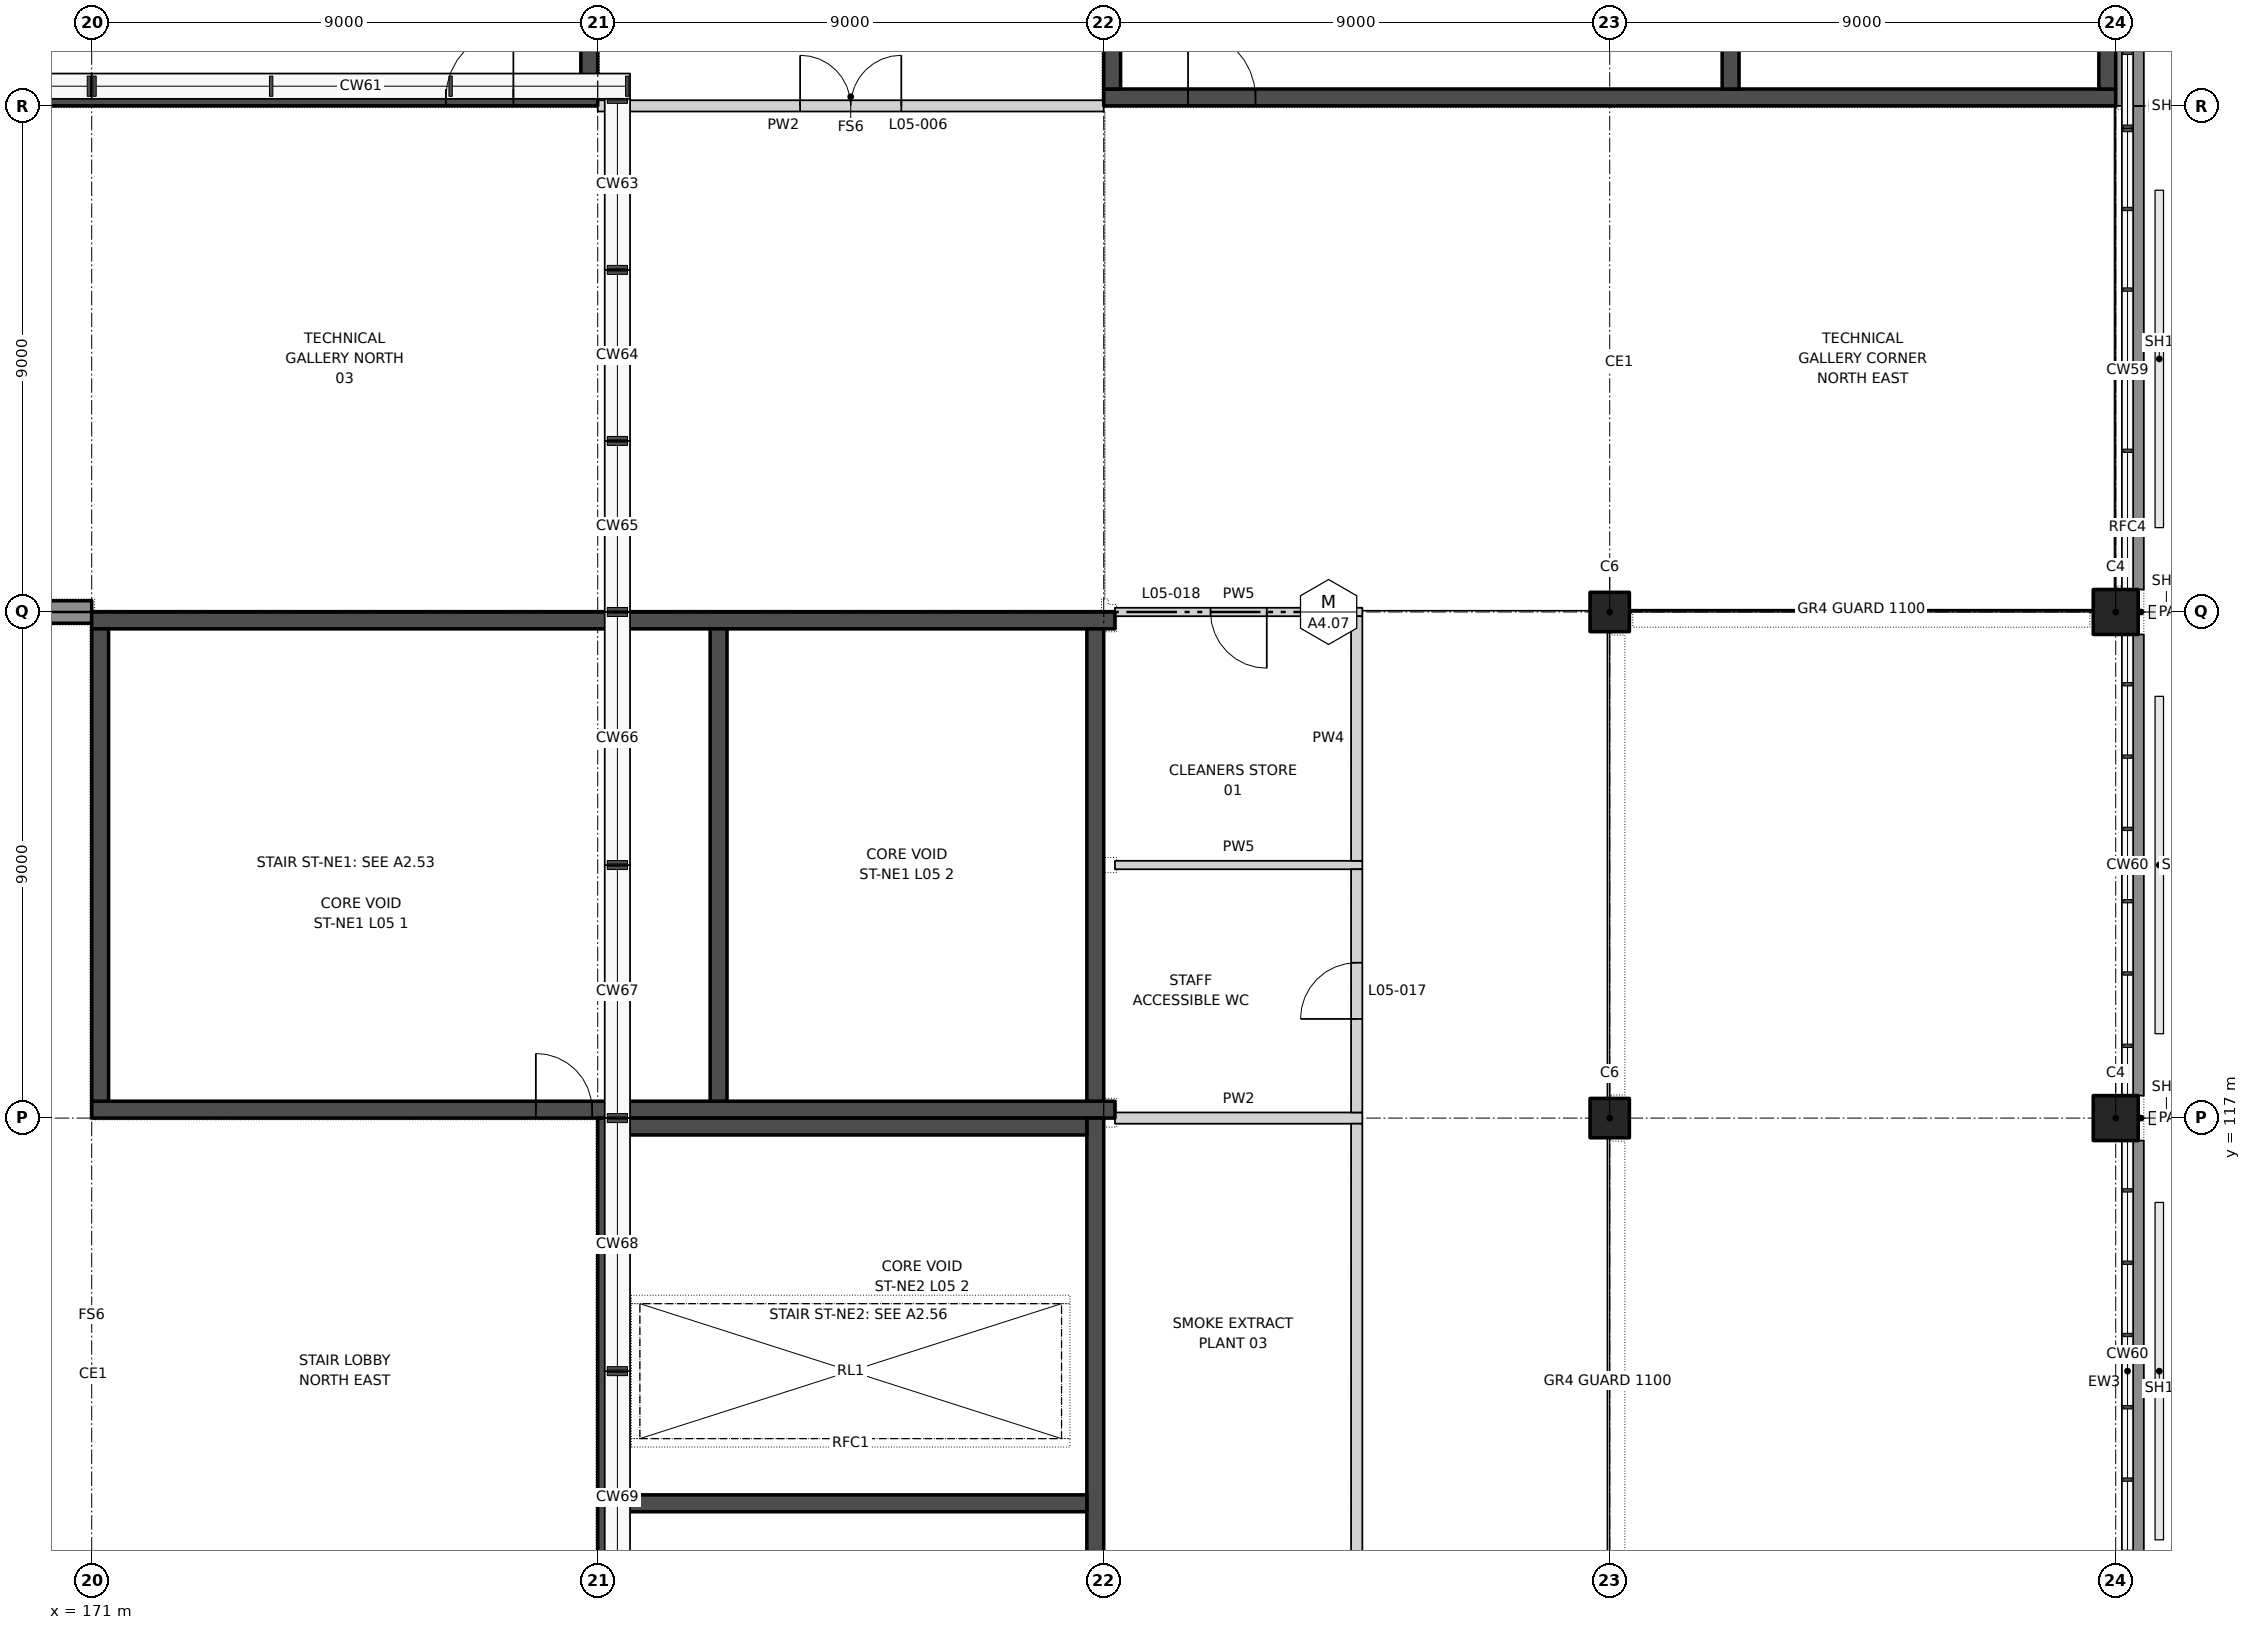
"""IFC4 building model, lengths in metres.
Left out: names, types, materials, properties, quantities, classifications, styles, units other than length and angle.
Written with IfcOpenShell. Run it as: python <this file> out.ifc"""

import sys

from ifc_helpers import new_model, si_unit, direction, frame, frame_2d, origin, origin_2d, place, context, subcontext, project, spatial, rectangle, extrude, element, fill, save


model = new_model("IFC4")
c1 = context("Model", 3, precision=1e-05, world=origin(), true_north=direction((0.0, 1.0)))
c2 = subcontext(c1, "Body", "Model", "MODEL_VIEW")
j1 = project(units=[si_unit("LENGTHUNIT", "METRE"), si_unit("PLANEANGLEUNIT", "RADIAN")], contexts=[c1])
p1 = place(None, origin())
s1 = spatial("IfcSite", under=j1, at=p1, CompositionType="ELEMENT")
p2 = place(p1, origin())
s2 = spatial("IfcBuilding", under=s1, at=p2, CompositionType="ELEMENT")
p3 = place(p2, frame((0.0, 0.0, 33.5)))
s3 = spatial("IfcBuildingStorey", under=s2, at=p3, CompositionType="ELEMENT", Elevation=33.5)
for number, where, z_axis, x_axis in (
    (1, (207.0, 117.0, 0.0), (0.0, 0.0, 1.0), (1.0, 0.0, 0.0)),
    (2, (207.0, 126.0, 0.0), (0.0, 0.0, 1.0), (1.0, 0.0, 0.0)),
):
    element("IfcColumn", number, at=place(p3, frame(where, z_axis=z_axis, x_axis=x_axis)), inside=s3, PredefinedType="COLUMN", context=c2, shape_type="SweptSolid", body=[
        extrude(rectangle(XDim=0.8, YDim=0.8, at=origin_2d()), origin(), (0.0, 0.0, 1.0), 4.0),
    ])
for number, where, z_axis, x_axis in (
    (3, (198.0, 117.0, 0.0), (0.0, 0.0, 1.0), (1.0, 0.0, 0.0)),
    (4, (198.0, 126.0, 0.0), (0.0, 0.0, 1.0), (1.0, 0.0, 0.0)),
):
    element("IfcColumn", number, at=place(p3, frame(where, z_axis=z_axis, x_axis=x_axis)), inside=s3, PredefinedType="COLUMN", context=c2, shape_type="SweptSolid", body=[
        extrude(rectangle(XDim=0.7, YDim=0.7, at=origin_2d()), origin(), (0.0, 0.0, 1.0), 4.0),
    ])
p4 = place(p3, frame((171.0, 126.0, 0.0), z_axis=(0.0, 0.0, 1.0), x_axis=(-1.0, 0.0, 0.0)))
e5 = element("IfcWall", 5, at=p4, inside=s3, PredefinedType="SOLIDWALL", context=c2, shape_type="SweptSolid", body=[
    extrude(rectangle(XDim=81.0, YDim=0.4, at=frame_2d((40.5, 0.0))), origin(), (0.0, 0.0, 1.0), 4.0),
])
p5 = place(p4, frame((75.9, 0.0, 0.0)))
e6 = element("IfcOpeningElement", 6, at=p5, cuts=e5, PredefinedType="OPENING", context=c2, shape_type="SweptSolid", body=[
    extrude(rectangle(XDim=1.2, YDim=2.1, at=frame_2d((0.6, 1.05))), frame((0.0, 0.21, 0.0), z_axis=(0.0, -1.0, 0.0), x_axis=(1.0, 0.0, 0.0)), (0.0, 0.0, 1.0), 0.42),
])
p6 = place(p4, frame((3.9, 0.0, 0.0)))
e7 = element("IfcOpeningElement", 7, at=p6, cuts=e5, PredefinedType="OPENING", context=c2, shape_type="SweptSolid", body=[
    extrude(rectangle(XDim=1.2, YDim=2.1, at=frame_2d((0.6, 1.05))), frame((0.0, 0.21, 0.0), z_axis=(0.0, -1.0, 0.0), x_axis=(1.0, 0.0, 0.0)), (0.0, 0.0, 1.0), 0.42),
])
p7 = place(p2, frame((0.0, 0.0, 28.0)))
s4 = spatial("IfcBuildingStorey", under=s2, at=p7, CompositionType="ELEMENT", Elevation=28.0)
p8 = place(p7, frame((198.35, 117.0, 0.0), z_axis=(0.0, 0.0, 1.0), x_axis=(1.0, 0.0, 0.0)))
e8 = element("IfcWall", 8, at=p8, inside=s4, PredefinedType="PARTITIONING", context=c2, shape_type="SweptSolid", body=[
    extrude(rectangle(XDim=8.25, YDim=0.15, at=frame_2d((4.125, 0.0))), origin(), (0.0, 0.0, 1.0), 9.5),
])
p9 = place(p3, frame((189.2, 117.0, 0.0), z_axis=(0.0, 0.0, 1.0), x_axis=(1.0, 0.0, 0.0)))
e9 = element("IfcWall", 9, at=p9, inside=s3, PredefinedType="PARTITIONING", context=c2, shape_type="SweptSolid", body=[
    extrude(rectangle(XDim=4.4, YDim=0.2, at=frame_2d((2.2, 0.0))), origin(), (0.0, 0.0, 1.0), 4.0),
])
p10 = place(p3, frame((189.2, 121.5, 0.0), z_axis=(0.0, 0.0, 1.0), x_axis=(1.0, 0.0, 0.0)))
e10 = element("IfcWall", 10, at=p10, inside=s3, PredefinedType="PARTITIONING", context=c2, shape_type="SweptSolid", body=[
    extrude(rectangle(XDim=4.4, YDim=0.15, at=frame_2d((2.2, 0.0))), origin(), (0.0, 0.0, 1.0), 4.0),
])
p11 = place(p3, frame((189.2, 126.0, 0.0), z_axis=(0.0, 0.0, 1.0), x_axis=(1.0, 0.0, 0.0)))
e11 = element("IfcWall", 11, at=p11, inside=s3, PredefinedType="PARTITIONING", context=c2, shape_type="SweptSolid", body=[
    extrude(rectangle(XDim=4.4, YDim=0.15, at=frame_2d((2.2, 0.0))), origin(), (0.0, 0.0, 1.0), 4.0),
])
p12 = place(p11, frame((1.7, 0.0, 0.0)))
e12 = element("IfcOpeningElement", 12, at=p12, cuts=e11, PredefinedType="OPENING", context=c2, shape_type="SweptSolid", body=[
    extrude(rectangle(XDim=1.0, YDim=2.1, at=frame_2d((0.5, 1.05))), frame((0.0, 0.085, 0.0), z_axis=(0.0, -1.0, 0.0), x_axis=(1.0, 0.0, 0.0)), (0.0, 0.0, 1.0), 0.17),
])
p13 = place(p3, frame((180.0, 135.0, 0.0), z_axis=(0.0, 0.0, 1.0), x_axis=(1.0, 0.0, 0.0)))
e13 = element("IfcWall", 13, at=p13, inside=s3, PredefinedType="PARTITIONING", context=c2, shape_type="SweptSolid", body=[
    extrude(rectangle(XDim=9.0, YDim=0.2, at=frame_2d((4.5, 0.0))), origin(), (0.0, 0.0, 1.0), 4.0),
])
p14 = place(p13, frame((3.6, 0.0, 0.0)))
e14 = element("IfcOpeningElement", 14, at=p14, cuts=e13, PredefinedType="OPENING", context=c2, shape_type="SweptSolid", body=[
    extrude(rectangle(XDim=1.8, YDim=2.1, at=frame_2d((0.9, 1.05))), frame((0.0, 0.11, 0.0), z_axis=(0.0, -1.0, 0.0), x_axis=(1.0, 0.0, 0.0)), (0.0, 0.0, 1.0), 0.22),
])
p15 = place(p3, frame((193.5, 99.1, 0.0), z_axis=(0.0, 0.0, 1.0), x_axis=(0.0, 1.0, 0.0)))
e15 = element("IfcWall", 15, at=p15, inside=s3, PredefinedType="PARTITIONING", context=c2, shape_type="SweptSolid", body=[
    extrude(rectangle(XDim=17.8, YDim=0.2, at=frame_2d((8.9, 0.0))), origin(), (0.0, 0.0, 1.0), 4.0),
])
p16 = place(p15, frame((8.0, 0.0, 0.0)))
e16 = element("IfcOpeningElement", 16, at=p16, cuts=e15, PredefinedType="OPENING", context=c2, shape_type="SweptSolid", body=[
    extrude(rectangle(XDim=1.8, YDim=2.1, at=frame_2d((0.9, 1.05))), frame((0.0, 0.11, 0.0), z_axis=(0.0, -1.0, 0.0), x_axis=(1.0, 0.0, 0.0)), (0.0, 0.0, 1.0), 0.22),
])
p17 = place(p3, frame((193.5, 117.1, 0.0), z_axis=(0.0, 0.0, 1.0), x_axis=(0.0, 1.0, 0.0)))
e17 = element("IfcWall", 17, at=p17, inside=s3, PredefinedType="PARTITIONING", context=c2, shape_type="SweptSolid", body=[
    extrude(rectangle(XDim=4.325, YDim=0.2, at=frame_2d((2.163, 0.0))), origin(), (0.0, 0.0, 1.0), 4.0),
])
p18 = place(p17, frame((1.663, 0.0, 0.0)))
e18 = element("IfcOpeningElement", 18, at=p18, cuts=e17, PredefinedType="OPENING", context=c2, shape_type="SweptSolid", body=[
    extrude(rectangle(XDim=1.0, YDim=2.1, at=frame_2d((0.5, 1.05))), frame((0.0, 0.11, 0.0), z_axis=(0.0, -1.0, 0.0), x_axis=(1.0, 0.0, 0.0)), (0.0, 0.0, 1.0), 0.22),
])
p19 = place(p3, frame((193.5, 121.575, 0.0), z_axis=(0.0, 0.0, 1.0), x_axis=(0.0, 1.0, 0.0)))
e19 = element("IfcWall", 19, at=p19, inside=s3, PredefinedType="PARTITIONING", context=c2, shape_type="SweptSolid", body=[
    extrude(rectangle(XDim=4.35, YDim=0.2, at=frame_2d((2.175, 0.0))), origin(), (0.0, 0.0, 1.0), 4.0),
])
p20 = place(p3, frame((207.35, 108.0, 0.0), z_axis=(0.0, 0.0, 1.0), x_axis=(0.0, 1.0, 0.0)))
e20 = element("IfcWall", 20, at=p20, inside=s3, PredefinedType="SOLIDWALL", context=c2, shape_type="SweptSolid", body=[
    extrude(rectangle(XDim=8.6, YDim=0.3, at=frame_2d((4.3, 0.0))), origin(), (0.0, 0.0, 1.0), 4.0),
])
p21 = place(p3, frame((207.35, 117.4, 0.0), z_axis=(0.0, 0.0, 1.0), x_axis=(0.0, 1.0, 0.0)))
e21 = element("IfcWall", 21, at=p21, inside=s3, PredefinedType="SOLIDWALL", context=c2, shape_type="SweptSolid", body=[
    extrude(rectangle(XDim=8.2, YDim=0.3, at=frame_2d((4.1, 0.0))), origin(), (0.0, 0.0, 1.0), 4.0),
])
p22 = place(p3, frame((207.35, 126.4, 0.0), z_axis=(0.0, 0.0, 1.0), x_axis=(0.0, 1.0, 0.0)))
e22 = element("IfcWall", 22, at=p22, inside=s3, PredefinedType="SOLIDWALL", context=c2, shape_type="SweptSolid", body=[
    extrude(rectangle(XDim=8.6, YDim=0.3, at=frame_2d((4.3, 0.0))), origin(), (0.0, 0.0, 1.0), 4.0),
])
p23 = place(p3, frame((207.25, 135.0, 0.0), z_axis=(0.0, 0.0, 1.0), x_axis=(0.0, 1.0, 0.0)))
e23 = element("IfcWall", 23, at=p23, inside=s3, PredefinedType="SOLIDWALL", context=c2, shape_type="SweptSolid", body=[
    extrude(rectangle(XDim=9.5, YDim=0.5, at=frame_2d((4.75, 0.0))), origin(), (0.0, 0.0, 1.0), 4.0),
])
p24 = place(p3, frame((180.0, 135.15, 0.0), z_axis=(0.0, 0.0, 1.0), x_axis=(-1.0, 0.0, 0.0)))
e24 = element("IfcWall", 24, at=p24, inside=s3, PredefinedType="SHEAR", context=c2, shape_type="SweptSolid", body=[
    extrude(rectangle(XDim=18.0, YDim=0.3, at=frame_2d((9.0, 0.0))), origin(), (0.0, 0.0, 1.0), 4.0),
])
p25 = place(p24, frame((1.5, 0.0, 0.0)))
e25 = element("IfcOpeningElement", 25, at=p25, cuts=e24, PredefinedType="OPENING", context=c2, shape_type="SweptSolid", body=[
    extrude(rectangle(XDim=1.2, YDim=2.1, at=frame_2d((0.6, 1.05))), frame((0.0, 0.16, 0.0), z_axis=(0.0, -1.0, 0.0), x_axis=(1.0, 0.0, 0.0)), (0.0, 0.0, 1.0), 0.32),
])
p26 = place(p3, frame((179.85, 135.3, 0.0), z_axis=(0.0, 0.0, 1.0), x_axis=(0.0, 1.0, 0.0)))
e26 = element("IfcWall", 26, at=p26, inside=s3, PredefinedType="SHEAR", context=c2, shape_type="SweptSolid", body=[
    extrude(rectangle(XDim=8.7, YDim=0.3, at=frame_2d((4.35, 0.0))), origin(), (0.0, 0.0, 1.0), 4.0),
])
p27 = place(p3, frame((189.0, 135.15, 0.0), z_axis=(0.0, 0.0, 1.0), x_axis=(1.0, 0.0, 0.0)))
e27 = element("IfcWall", 27, at=p27, inside=s3, PredefinedType="SHEAR", context=c2, shape_type="SweptSolid", body=[
    extrude(rectangle(XDim=18.0, YDim=0.3, at=frame_2d((9.0, 0.0))), origin(), (0.0, 0.0, 1.0), 4.0),
])
p28 = place(p27, frame((1.5, 0.0, 0.0)))
e28 = element("IfcOpeningElement", 28, at=p28, cuts=e27, PredefinedType="OPENING", context=c2, shape_type="SweptSolid", body=[
    extrude(rectangle(XDim=1.2, YDim=2.1, at=frame_2d((0.6, 1.05))), frame((0.0, 0.16, 0.0), z_axis=(0.0, -1.0, 0.0), x_axis=(1.0, 0.0, 0.0)), (0.0, 0.0, 1.0), 0.32),
])
for number, where, z_axis, x_axis in (
    (29, (189.15, 135.3, 0.0), (0.0, 0.0, 1.0), (0.0, 1.0, 0.0)),
    (30, (206.85, 135.3, 0.0), (0.0, 0.0, 1.0), (0.0, 1.0, 0.0)),
    (31, (200.15, 135.3, 0.0), (0.0, 0.0, 1.0), (0.0, 1.0, 0.0)),
):
    element("IfcWall", number, at=place(p3, frame(where, z_axis=z_axis, x_axis=x_axis)), inside=s3, PredefinedType="SHEAR", context=c2, shape_type="SweptSolid", body=[
        extrude(rectangle(XDim=8.7, YDim=0.3, at=frame_2d((4.35, 0.0))), origin(), (0.0, 0.0, 1.0), 4.0),
    ])
p29 = place(p3, frame((171.0, 117.15, 0.0), z_axis=(0.0, 0.0, 1.0), x_axis=(1.0, 0.0, 0.0)))
e32 = element("IfcWall", 32, at=p29, inside=s3, PredefinedType="SHEAR", context=c2, shape_type="SweptSolid", body=[
    extrude(rectangle(XDim=18.2, YDim=0.3, at=frame_2d((9.1, 0.0))), origin(), (0.0, 0.0, 1.0), 4.0),
])
p30 = place(p29, frame((7.9, 0.0, 0.0)))
e33 = element("IfcOpeningElement", 33, at=p30, cuts=e32, PredefinedType="OPENING", context=c2, shape_type="SweptSolid", body=[
    extrude(rectangle(XDim=1.0, YDim=2.1, at=frame_2d((0.5, 1.05))), frame((0.0, 0.16, 0.0), z_axis=(0.0, -1.0, 0.0), x_axis=(1.0, 0.0, 0.0)), (0.0, 0.0, 1.0), 0.32),
])
p31 = place(p3, frame((171.0, 125.85, 0.0), z_axis=(0.0, 0.0, 1.0), x_axis=(1.0, 0.0, 0.0)))
e34 = element("IfcWall", 34, at=p31, inside=s3, PredefinedType="SHEAR", context=c2, shape_type="SweptSolid", body=[
    extrude(rectangle(XDim=18.2, YDim=0.3, at=frame_2d((9.1, 0.0))), origin(), (0.0, 0.0, 1.0), 4.0),
])
for number, where, z_axis, x_axis in (
    (35, (171.15, 117.3, 0.0), (0.0, 0.0, 1.0), (0.0, 1.0, 0.0)),
    (36, (188.85, 117.3, 0.0), (0.0, 0.0, 1.0), (0.0, 1.0, 0.0)),
    (37, (182.15, 117.3, 0.0), (0.0, 0.0, 1.0), (0.0, 1.0, 0.0)),
):
    element("IfcWall", number, at=place(p3, frame(where, z_axis=z_axis, x_axis=x_axis)), inside=s3, PredefinedType="SHEAR", context=c2, shape_type="SweptSolid", body=[
        extrude(rectangle(XDim=8.4, YDim=0.3, at=frame_2d((4.2, 0.0))), origin(), (0.0, 0.0, 1.0), 4.0),
    ])
p32 = place(p3, frame((180.15, 99.0, 0.0), z_axis=(0.0, 0.0, 1.0), x_axis=(0.0, 1.0, 0.0)))
e38 = element("IfcWall", 38, at=p32, inside=s3, PredefinedType="SHEAR", context=c2, shape_type="SweptSolid", body=[
    extrude(rectangle(XDim=18.0, YDim=0.3, at=frame_2d((9.0, 0.0))), origin(), (0.0, 0.0, 1.0), 4.0),
])
p33 = place(p32, frame((8.6, 0.0, 0.0)))
e39 = element("IfcOpeningElement", 39, at=p33, cuts=e38, PredefinedType="OPENING", context=c2, shape_type="SweptSolid", body=[
    extrude(rectangle(XDim=1.2, YDim=2.1, at=frame_2d((0.6, 1.05))), frame((0.0, 0.16, 0.0), z_axis=(0.0, -1.0, 0.0), x_axis=(1.0, 0.0, 0.0)), (0.0, 0.0, 1.0), 0.32),
])
p34 = place(p3, frame((188.85, 99.0, 0.0), z_axis=(0.0, 0.0, 1.0), x_axis=(0.0, 1.0, 0.0)))
e40 = element("IfcWall", 40, at=p34, inside=s3, PredefinedType="SHEAR", context=c2, shape_type="SweptSolid", body=[
    extrude(rectangle(XDim=18.0, YDim=0.3, at=frame_2d((9.0, 0.0))), origin(), (0.0, 0.0, 1.0), 4.0),
])
for number, where, z_axis, x_axis in (
    (41, (180.3, 116.85, 0.0), (0.0, 0.0, 1.0), (1.0, 0.0, 0.0)),
    (42, (180.3, 110.15, 0.0), (0.0, 0.0, 1.0), (1.0, 0.0, 0.0)),
):
    element("IfcWall", number, at=place(p3, frame(where, z_axis=z_axis, x_axis=x_axis)), inside=s3, PredefinedType="SHEAR", context=c2, shape_type="SweptSolid", body=[
        extrude(rectangle(XDim=8.4, YDim=0.3, at=frame_2d((4.2, 0.0))), origin(), (0.0, 0.0, 1.0), 4.0),
    ])
p35 = place(p14, origin())
e43 = element("IfcDoor", 43, at=p35, inside=s3, OperationType="DOUBLE_DOOR_DOUBLE_SWING", PredefinedType="DOOR", context=c2, shape_type="SweptSolid", body=[
    extrude(rectangle(XDim=1.8, YDim=2.1, at=frame_2d((0.9, 1.05))), frame((0.0, 0.025, 0.0), z_axis=(0.0, -1.0, 0.0), x_axis=(1.0, 0.0, 0.0)), (0.0, 0.0, 1.0), 0.05),
])
fill(e14, e43)
p36 = place(p18, origin())
e44 = element("IfcDoor", 44, at=p36, inside=s3, OperationType="SINGLE_SWING_LEFT", PredefinedType="DOOR", context=c2, shape_type="SweptSolid", body=[
    extrude(rectangle(XDim=1.0, YDim=2.1, at=frame_2d((0.5, 1.05))), frame((0.0, 0.025, 0.0), z_axis=(0.0, -1.0, 0.0), x_axis=(1.0, 0.0, 0.0)), (0.0, 0.0, 1.0), 0.05),
])
fill(e18, e44)
p37 = place(p12, frame((1.0, 0.0, 0.0), z_axis=(0.0, 0.0, 1.0), x_axis=(-1.0, 0.0, 0.0)))
e45 = element("IfcDoor", 45, at=p37, inside=s3, OperationType="SINGLE_SWING_LEFT", PredefinedType="DOOR", context=c2, shape_type="SweptSolid", body=[
    extrude(rectangle(XDim=1.0, YDim=2.1, at=frame_2d((0.5, 1.05))), frame((0.0, 0.025, 0.0), z_axis=(0.0, -1.0, 0.0), x_axis=(1.0, 0.0, 0.0)), (0.0, 0.0, 1.0), 0.05),
])
fill(e12, e45)
p38 = place(p25, frame((1.2, 0.0, 0.0), z_axis=(0.0, 0.0, 1.0), x_axis=(-1.0, 0.0, 0.0)))
e46 = element("IfcDoor", 46, at=p38, inside=s3, OperationType="SINGLE_SWING_RIGHT", PredefinedType="DOOR", context=c2, shape_type="SweptSolid", body=[
    extrude(rectangle(XDim=1.2, YDim=2.1, at=frame_2d((0.6, 1.05))), frame((0.0, 0.025, 0.0), z_axis=(0.0, -1.0, 0.0), x_axis=(1.0, 0.0, 0.0)), (0.0, 0.0, 1.0), 0.05),
])
fill(e25, e46)
p39 = place(p28, origin())
e47 = element("IfcDoor", 47, at=p39, inside=s3, OperationType="SINGLE_SWING_LEFT", PredefinedType="DOOR", context=c2, shape_type="SweptSolid", body=[
    extrude(rectangle(XDim=1.2, YDim=2.1, at=frame_2d((0.6, 1.05))), frame((0.0, 0.025, 0.0), z_axis=(0.0, -1.0, 0.0), x_axis=(1.0, 0.0, 0.0)), (0.0, 0.0, 1.0), 0.05),
])
fill(e28, e47)
p40 = place(p30, origin())
e48 = element("IfcDoor", 48, at=p40, inside=s3, OperationType="SINGLE_SWING_LEFT", PredefinedType="DOOR", context=c2, shape_type="SweptSolid", body=[
    extrude(rectangle(XDim=1.0, YDim=2.1, at=frame_2d((0.5, 1.05))), frame((0.0, 0.025, 0.0), z_axis=(0.0, -1.0, 0.0), x_axis=(1.0, 0.0, 0.0)), (0.0, 0.0, 1.0), 0.05),
])
fill(e33, e48)
p41 = place(p2, frame((0.0, 0.0, 47.1)))
p42 = place(p41, frame((0.0, 0.0, -0.3)))
p43 = place(p42, frame((184.5, 112.5, 0.0)))
p44 = place(p43, frame((0.0, 0.0, 0.25)))
e49 = element("IfcWindow", 49, at=p44, inside=s3, PartitioningType="SINGLE_PANEL", PredefinedType="SKYLIGHT", context=c2, shape_type="SweptSolid", body=[
    extrude(rectangle(XDim=7.5, YDim=2.4, at=origin_2d()), origin(), (0.0, 0.0, 1.0), 0.05),
])
save(model, sys.argv[1])
